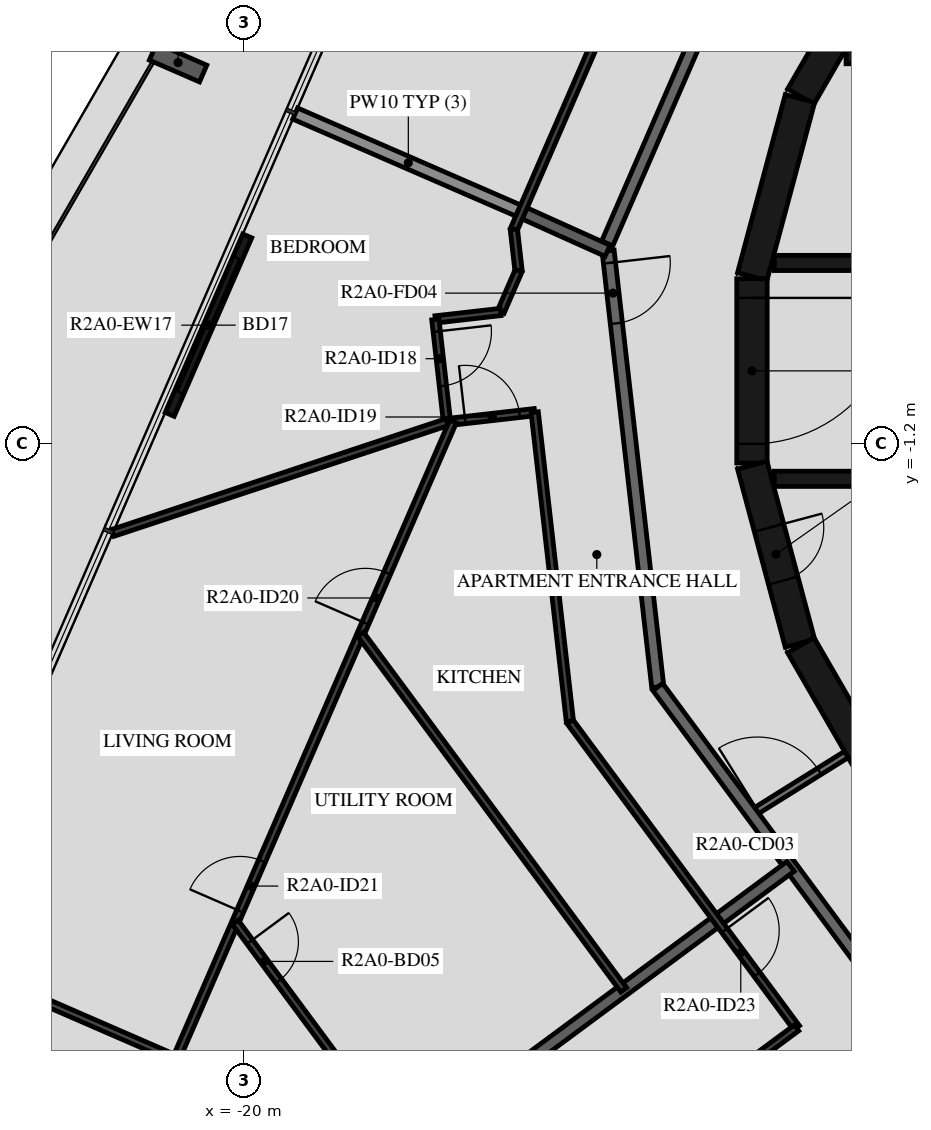
"""IFC4 building model, lengths in metres.
Left out: names, types, materials, properties, quantities, classifications, styles, units other than length and angle.
Written with IfcOpenShell. Run it as: python <this file> out.ifc"""

import sys

from ifc_helpers import new_model, si_unit, direction, frame, frame_2d, origin, origin_2d, place, context, subcontext, project, spatial, rectangle, i_section, extrude, element, fill, save


model = new_model("IFC4")
c1 = context("Model", 3, precision=1e-05, world=origin(), true_north=direction((0.0, 1.0)))
c2 = subcontext(c1, "Body", "Model", "MODEL_VIEW")
j1 = project(units=[si_unit("LENGTHUNIT", "METRE"), si_unit("PLANEANGLEUNIT", "RADIAN")], contexts=[c1])
p1 = place(None, origin())
s1 = spatial("IfcSite", under=j1, at=p1, CompositionType="ELEMENT")
p2 = place(p1, origin())
s2 = spatial("IfcBuilding", under=s1, at=p2, CompositionType="ELEMENT")
p3 = place(p2, frame((0.0, 0.0, 76.7)))
s3 = spatial("IfcBuildingStorey", under=s2, at=p3, CompositionType="ELEMENT", Elevation=76.7)
p4 = place(p3, frame((-21.085, 5.069, -0.45), z_axis=(0.0, 0.0, 1.0), x_axis=(0.398749038162, 0.917060087761, 0.0)))
e1 = element("IfcColumn", 1, at=p4, inside=s3, PredefinedType="COLUMN", context=c2, shape_type="SweptSolid", body=[
    extrude(i_section(OverallWidth=0.3, OverallDepth=0.9, WebThickness=0.019, FlangeThickness=0.035, FilletRadius=0.03, at=origin_2d()), origin(), (0.0, 0.0, 1.0), 3.57),
])
p5 = place(p3, frame((-19.947, 2.219, 0.0), z_axis=(0.0, 0.0, 1.0), x_axis=(-0.398784695066, -0.917044582876, 0.0)))
e2 = element("IfcWall", 2, at=p5, inside=s3, PredefinedType="STANDARD", context=c2, shape_type="SweptSolid", body=[
    extrude(rectangle(XDim=3.2, YDim=0.16, at=frame_2d((1.6, 0.0))), origin(), (0.0, 0.0, 1.0), 3.12),
])
p6 = place(p5, frame((0.4, 0.0, 0.0)))
e3 = element("IfcOpeningElement", 3, at=p6, cuts=e2, PredefinedType="OPENING", context=c2, shape_type="SweptSolid", body=[
    extrude(rectangle(XDim=2.4, YDim=2.4, at=frame_2d((1.2, 1.2))), frame((0.0, 0.09, 0.0), z_axis=(0.0, -1.0, 0.0), x_axis=(1.0, 0.0, 0.0)), (0.0, 0.0, 1.0), 0.18),
])
for number, where, z_axis, x_axis in (
    (4, (-9.329, 7.137, 0.0), (0.0, 0.0, 1.0), (-0.5, -0.866, 0.0)),
    (5, (-10.858, 4.479, 0.0), (0.0, 0.0, 1.0), (-0.259, -0.966, 0.0)),
):
    element("IfcWall", number, at=place(p3, frame(where, z_axis=z_axis, x_axis=x_axis)), inside=s3, PredefinedType="SHEAR", context=c2, shape_type="SweptSolid", body=[
        extrude(rectangle(XDim=3.033, YDim=0.5, at=frame_2d((1.516, 0.0))), origin(), (0.0, 0.0, 1.0), 3.12),
    ])
p7 = place(p3, frame((-11.647, 1.516, 0.0), z_axis=(0.0, 0.0, 1.0), x_axis=(0.0, -1.0, 0.0)))
e6 = element("IfcWall", 6, at=p7, inside=s3, PredefinedType="SHEAR", context=c2, shape_type="SweptSolid", body=[
    extrude(rectangle(XDim=3.033, YDim=0.5, at=frame_2d((1.516, 0.0))), origin(), (0.0, 0.0, 1.0), 3.12),
])
p8 = place(p7, frame((0.316, 0.0, 0.0)))
e7 = element("IfcOpeningElement", 7, at=p8, cuts=e6, PredefinedType="OPENING", context=c2, shape_type="SweptSolid", body=[
    extrude(rectangle(XDim=2.4, YDim=2.1, at=frame_2d((1.2, 1.05))), frame((0.0, 0.26, 0.0), z_axis=(0.0, -1.0, 0.0), x_axis=(1.0, 0.0, 0.0)), (0.0, 0.0, 1.0), 0.52),
])
p9 = place(p3, frame((-11.643, -1.55, 0.0), z_axis=(0.0, 0.0, 1.0), x_axis=(0.258734743916, -0.965948410781, 0.0)))
e8 = element("IfcWall", 8, at=p9, inside=s3, PredefinedType="SHEAR", context=c2, shape_type="SweptSolid", body=[
    extrude(rectangle(XDim=3.033, YDim=0.5, at=frame_2d((1.516, 0.0))), origin(), (0.0, 0.0, 1.0), 3.12),
])
p10 = place(p9, frame((1.066, 0.0, 0.0)))
e9 = element("IfcOpeningElement", 9, at=p10, cuts=e8, PredefinedType="OPENING", context=c2, shape_type="SweptSolid", body=[
    extrude(rectangle(XDim=0.9, YDim=2.1, at=frame_2d((0.45, 1.05))), frame((0.0, 0.26, 0.0), z_axis=(0.0, -1.0, 0.0), x_axis=(1.0, 0.0, 0.0)), (0.0, 0.0, 1.0), 0.52),
])
p11 = place(p3, frame((-10.845, -4.51, 0.0), z_axis=(0.0, 0.0, 1.0), x_axis=(0.500087131594, -0.865975092491, 0.0)))
e10 = element("IfcWall", 10, at=p11, inside=s3, PredefinedType="SHEAR", context=c2, shape_type="SweptSolid", body=[
    extrude(rectangle(XDim=3.033, YDim=0.5, at=frame_2d((1.516, 0.0))), origin(), (0.0, 0.0, 1.0), 3.12),
])
p12 = place(p3, frame((-7.0, 5.175, 0.0), z_axis=(0.0, 0.0, 1.0), x_axis=(-1.0, 0.0, 0.0)))
e11 = element("IfcWall", 11, at=p12, inside=s3, PredefinedType="SHEAR", context=c2, shape_type="SweptSolid", body=[
    extrude(rectangle(XDim=3.1, YDim=0.25, at=frame_2d((1.55, 0.0))), origin(), (0.0, 0.0, 1.0), 3.12),
])
p13 = place(p3, frame((-11.28, 1.775, 0.0), z_axis=(0.0, 0.0, 1.0), x_axis=(1.0, 0.0, 0.0)))
e12 = element("IfcWall", 12, at=p13, inside=s3, PredefinedType="SHEAR", context=c2, shape_type="SweptSolid", body=[
    extrude(rectangle(XDim=14.38, YDim=0.25, at=frame_2d((7.19, 0.0))), origin(), (0.0, 0.0, 1.0), 3.12),
])
p14 = place(p13, frame((2.13, 0.0, 0.0)))
e13 = element("IfcOpeningElement", 13, at=p14, cuts=e12, PredefinedType="OPENING", context=c2, shape_type="SweptSolid", body=[
    extrude(rectangle(XDim=1.1, YDim=2.1, at=frame_2d((0.55, 1.05))), frame((0.0, 0.135, 0.0), z_axis=(0.0, -1.0, 0.0), x_axis=(1.0, 0.0, 0.0)), (0.0, 0.0, 1.0), 0.27),
])
p15 = place(p13, frame((4.28, 0.0, 0.0)))
e14 = element("IfcOpeningElement", 14, at=p15, cuts=e12, PredefinedType="OPENING", context=c2, shape_type="SweptSolid", body=[
    extrude(rectangle(XDim=1.1, YDim=2.1, at=frame_2d((0.55, 1.05))), frame((0.0, 0.135, 0.0), z_axis=(0.0, -1.0, 0.0), x_axis=(1.0, 0.0, 0.0)), (0.0, 0.0, 1.0), 0.27),
])
p16 = place(p13, frame((6.43, 0.0, 0.0)))
e15 = element("IfcOpeningElement", 15, at=p16, cuts=e12, PredefinedType="OPENING", context=c2, shape_type="SweptSolid", body=[
    extrude(rectangle(XDim=1.1, YDim=2.1, at=frame_2d((0.55, 1.05))), frame((0.0, 0.135, 0.0), z_axis=(0.0, -1.0, 0.0), x_axis=(1.0, 0.0, 0.0)), (0.0, 0.0, 1.0), 0.27),
])
p17 = place(p13, frame((8.58, 0.0, 0.0)))
e16 = element("IfcOpeningElement", 16, at=p17, cuts=e12, PredefinedType="OPENING", context=c2, shape_type="SweptSolid", body=[
    extrude(rectangle(XDim=1.1, YDim=2.1, at=frame_2d((0.55, 1.05))), frame((0.0, 0.135, 0.0), z_axis=(0.0, -1.0, 0.0), x_axis=(1.0, 0.0, 0.0)), (0.0, 0.0, 1.0), 0.27),
])
p18 = place(p13, frame((11.905, 0.0, 0.0)))
e17 = element("IfcOpeningElement", 17, at=p18, cuts=e12, PredefinedType="OPENING", context=c2, shape_type="SweptSolid", body=[
    extrude(rectangle(XDim=0.9, YDim=2.1, at=frame_2d((0.45, 1.05))), frame((0.0, 0.135, 0.0), z_axis=(0.0, -1.0, 0.0), x_axis=(1.0, 0.0, 0.0)), (0.0, 0.0, 1.0), 0.27),
])
p19 = place(p3, frame((-11.28, -1.775, 0.0), z_axis=(0.0, 0.0, 1.0), x_axis=(1.0, 0.0, 0.0)))
e18 = element("IfcWall", 18, at=p19, inside=s3, PredefinedType="SHEAR", context=c2, shape_type="SweptSolid", body=[
    extrude(rectangle(XDim=14.38, YDim=0.25, at=frame_2d((7.19, 0.0))), origin(), (0.0, 0.0, 1.0), 3.12),
])
p20 = place(p19, frame((7.605, 0.0, 0.0)))
e19 = element("IfcOpeningElement", 19, at=p20, cuts=e18, PredefinedType="OPENING", context=c2, shape_type="SweptSolid", body=[
    extrude(rectangle(XDim=0.9, YDim=2.1, at=frame_2d((0.45, 1.05))), frame((0.0, 0.135, 0.0), z_axis=(0.0, -1.0, 0.0), x_axis=(1.0, 0.0, 0.0)), (0.0, 0.0, 1.0), 0.27),
])
p21 = place(p19, frame((10.83, 0.0, 0.0)))
e20 = element("IfcOpeningElement", 20, at=p21, cuts=e18, PredefinedType="OPENING", context=c2, shape_type="SweptSolid", body=[
    extrude(rectangle(XDim=0.9, YDim=2.1, at=frame_2d((0.45, 1.05))), frame((0.0, 0.135, 0.0), z_axis=(0.0, -1.0, 0.0), x_axis=(1.0, 0.0, 0.0)), (0.0, 0.0, 1.0), 0.27),
])
p22 = place(p19, frame((12.98, 0.0, 0.0)))
e21 = element("IfcOpeningElement", 21, at=p22, cuts=e18, PredefinedType="OPENING", context=c2, shape_type="SweptSolid", body=[
    extrude(rectangle(XDim=0.9, YDim=2.1, at=frame_2d((0.45, 1.05))), frame((0.0, 0.135, 0.0), z_axis=(0.0, -1.0, 0.0), x_axis=(1.0, 0.0, 0.0)), (0.0, 0.0, 1.0), 0.27),
])
p23 = place(p3, frame((-11.654, -7.282, 0.0), z_axis=(0.0, 0.0, 1.0), x_axis=(0.848117698675, 0.529807860638, 0.0)))
e22 = element("IfcWall", 22, at=p23, inside=s3, PredefinedType="PARTITIONING", context=c2, shape_type="SweptSolid", body=[
    extrude(rectangle(XDim=1.838, YDim=0.12, at=frame_2d((0.919, 0.0))), origin(), (0.0, 0.0, 1.0), 3.12),
])
p24 = place(p23, frame((0.115, 0.0, 0.0)))
e23 = element("IfcOpeningElement", 23, at=p24, cuts=e22, PredefinedType="OPENING", context=c2, shape_type="SweptSolid", body=[
    extrude(rectangle(XDim=1.2, YDim=2.1, at=frame_2d((0.6, 1.05))), frame((0.0, 0.07, 0.0), z_axis=(0.0, -1.0, 0.0), x_axis=(1.0, 0.0, 0.0)), (0.0, 0.0, 1.0), 0.14),
])
p25 = place(p3, frame((-11.1, 8.829, 0.0), z_axis=(0.0, 0.0, 1.0), x_axis=(-0.398741918631, -0.917063183388, 0.0)))
e24 = element("IfcWall", 24, at=p25, inside=s3, PredefinedType="STANDARD", context=c2, shape_type="SweptSolid", body=[
    extrude(rectangle(XDim=7.342, YDim=0.2, at=frame_2d((3.671, 0.0))), origin(), (0.0, 0.0, 1.0), 3.12),
])
p26 = place(p3, frame((-14.013, 1.974, 0.0), z_axis=(0.0, 0.0, 1.0), x_axis=(0.113196526349, -0.993572617589, 0.0)))
e25 = element("IfcWall", 25, at=p26, inside=s3, PredefinedType="STANDARD", context=c2, shape_type="SweptSolid", body=[
    extrude(rectangle(XDim=7.219, YDim=0.2, at=frame_2d((3.609, 0.0))), origin(), (0.0, 0.0, 1.0), 3.12),
])
p27 = place(p26, frame((0.2, 0.0, 0.0)))
e26 = element("IfcOpeningElement", 26, at=p27, cuts=e25, PredefinedType="OPENING", context=c2, shape_type="SweptSolid", body=[
    extrude(rectangle(XDim=1.0, YDim=2.1, at=frame_2d((0.5, 1.05))), frame((0.0, 0.11, 0.0), z_axis=(0.0, -1.0, 0.0), x_axis=(1.0, 0.0, 0.0)), (0.0, 0.0, 1.0), 0.22),
])
p28 = place(p3, frame((-13.196, -5.198, 0.0), z_axis=(0.0, 0.0, 1.0), x_axis=(0.594805187394, -0.803869883159, 0.0)))
e27 = element("IfcWall", 27, at=p28, inside=s3, PredefinedType="STANDARD", context=c2, shape_type="SweptSolid", body=[
    extrude(rectangle(XDim=7.342, YDim=0.2, at=frame_2d((3.671, 0.0))), origin(), (0.0, 0.0, 1.0), 3.12),
])
p29 = place(p3, frame((-15.439, 2.613, 0.0), z_axis=(0.0, 0.0, 1.0), x_axis=(0.911830308819, -0.410567275752, 0.0)))
e28 = element("IfcWall", 28, at=p29, inside=s3, PredefinedType="STANDARD", context=c2, shape_type="SweptSolid", body=[
    extrude(rectangle(XDim=1.553, YDim=0.2, at=frame_2d((0.777, 0.0))), origin(), (0.0, 0.0, 1.0), 3.12),
])
p30 = place(p3, frame((-19.159, 4.231, 0.0), z_axis=(0.0, 0.0, 1.0), x_axis=(0.91704996524, -0.398772317562, 0.0)))
e29 = element("IfcWall", 29, at=p30, inside=s3, PredefinedType="STANDARD", context=c2, shape_type="SweptSolid", body=[
    extrude(rectangle(XDim=4.057, YDim=0.2, at=frame_2d((2.029, 0.0))), origin(), (0.0, 0.0, 1.0), 2.73),
])
p31 = place(p3, frame((-15.41, -11.403, 0.0), z_axis=(0.0, 0.0, 1.0), x_axis=(0.803887568227, 0.594781285558, 0.0)))
e30 = element("IfcWall", 30, at=p31, inside=s3, PredefinedType="STANDARD", context=c2, shape_type="SweptSolid", body=[
    extrude(rectangle(XDim=5.47, YDim=0.2, at=frame_2d((2.735, 0.0))), origin(), (0.0, 0.0, 1.0), 3.12),
])
p32 = place(p3, frame((-14.049, 5.81, 0.0), z_axis=(0.0, 0.0, 1.0), x_axis=(-0.398707311688, -0.917078229818, 0.0)))
e31 = element("IfcWall", 31, at=p32, inside=s3, PredefinedType="PARTITIONING", context=c2, shape_type="SweptSolid", body=[
    extrude(rectangle(XDim=3.799, YDim=0.12, at=frame_2d((1.899, 0.0))), origin(), (0.0, 0.0, 1.0), 3.12),
])
p33 = place(p3, frame((-15.563, 2.326, 0.0), z_axis=(0.0, 0.0, 1.0), x_axis=(0.113013677091, -0.993593432341, 0.0)))
e32 = element("IfcWall", 32, at=p33, inside=s3, PredefinedType="PARTITIONING", context=c2, shape_type="SweptSolid", body=[
    extrude(rectangle(XDim=0.685, YDim=0.12, at=frame_2d((0.342, 0.0))), origin(), (0.0, 0.0, 1.0), 3.12),
])
p34 = place(p3, frame((-15.486, 1.646, 0.0), z_axis=(0.0, 0.0, 1.0), x_axis=(-0.398701933952, -0.917080567814, 0.0)))
e33 = element("IfcWall", 33, at=p34, inside=s3, PredefinedType="PARTITIONING", context=c2, shape_type="SweptSolid", body=[
    extrude(rectangle(XDim=0.739, YDim=0.12, at=frame_2d((0.369, 0.0))), origin(), (0.0, 0.0, 1.0), 3.12),
])
p35 = place(p3, frame((-15.78, 0.968, 0.0), z_axis=(0.0, 0.0, 1.0), x_axis=(-0.99355448905, -0.113355534887, 0.0)))
e34 = element("IfcWall", 34, at=p35, inside=s3, PredefinedType="PARTITIONING", context=c2, shape_type="SweptSolid", body=[
    extrude(rectangle(XDim=1.081, YDim=0.12, at=frame_2d((0.541, 0.0))), origin(), (0.0, 0.0, 1.0), 3.12),
])
p36 = place(p3, frame((-16.854, 0.846, 0.0), z_axis=(0.0, 0.0, 1.0), x_axis=(0.113173930474, -0.993575191649, 0.0)))
e35 = element("IfcWall", 35, at=p36, inside=s3, PredefinedType="PARTITIONING", context=c2, shape_type="SweptSolid", body=[
    extrude(rectangle(XDim=1.7, YDim=0.12, at=frame_2d((0.85, 0.0))), origin(), (0.0, 0.0, 1.0), 3.12),
])
p37 = place(p36, frame((0.2, 0.0, 0.0)))
e36 = element("IfcOpeningElement", 36, at=p37, cuts=e35, PredefinedType="OPENING", context=c2, shape_type="SweptSolid", body=[
    extrude(rectangle(XDim=0.9, YDim=2.1, at=frame_2d((0.45, 1.05))), frame((0.0, 0.07, 0.0), z_axis=(0.0, -1.0, 0.0), x_axis=(1.0, 0.0, 0.0)), (0.0, 0.0, 1.0), 0.14),
])
p38 = place(p3, frame((-16.563, -0.832, 0.0), z_axis=(0.0, 0.0, 1.0), x_axis=(0.993578035261, 0.113148963084, 0.0)))
e37 = element("IfcWall", 37, at=p38, inside=s3, PredefinedType="PARTITIONING", context=c2, shape_type="SweptSolid", body=[
    extrude(rectangle(XDim=1.351, YDim=0.12, at=frame_2d((0.675, 0.0))), origin(), (0.0, 0.0, 1.0), 3.12),
])
p39 = place(p38, frame((0.2, 0.0, 0.0)))
e38 = element("IfcOpeningElement", 38, at=p39, cuts=e37, PredefinedType="OPENING", context=c2, shape_type="SweptSolid", body=[
    extrude(rectangle(XDim=0.9, YDim=2.1, at=frame_2d((0.45, 1.05))), frame((0.0, 0.07, 0.0), z_axis=(0.0, -1.0, 0.0), x_axis=(1.0, 0.0, 0.0)), (0.0, 0.0, 1.0), 0.14),
])
p40 = place(p3, frame((-15.221, -0.679, 0.0), z_axis=(0.0, 0.0, 1.0), x_axis=(0.113219875647, -0.993569957154, 0.0)))
e39 = element("IfcWall", 39, at=p40, inside=s3, PredefinedType="PARTITIONING", context=c2, shape_type="SweptSolid", body=[
    extrude(rectangle(XDim=5.121, YDim=0.12, at=frame_2d((2.561, 0.0))), origin(), (0.0, 0.0, 1.0), 3.12),
])
p41 = place(p3, frame((-14.641, -5.767, 0.0), z_axis=(0.0, 0.0, 1.0), x_axis=(0.594825885962, -0.803854567313, 0.0)))
e40 = element("IfcWall", 40, at=p41, inside=s3, PredefinedType="PARTITIONING", context=c2, shape_type="SweptSolid", body=[
    extrude(rectangle(XDim=6.266, YDim=0.12, at=frame_2d((3.133, 0.0))), origin(), (0.0, 0.0, 1.0), 3.12),
])
p42 = place(p41, frame((4.273, 0.0, 0.0)))
e41 = element("IfcOpeningElement", 41, at=p42, cuts=e40, PredefinedType="OPENING", context=c2, shape_type="SweptSolid", body=[
    extrude(rectangle(XDim=0.9, YDim=2.1, at=frame_2d((0.45, 1.05))), frame((0.0, 0.07, 0.0), z_axis=(0.0, -1.0, 0.0), x_axis=(1.0, 0.0, 0.0)), (0.0, 0.0, 1.0), 0.14),
])
p43 = place(p3, frame((-22.157, -2.664, 0.0), z_axis=(0.0, 0.0, 1.0), x_axis=(0.949263673698, 0.314481283698, 0.0)))
e42 = element("IfcWall", 42, at=p43, inside=s3, PredefinedType="PARTITIONING", context=c2, shape_type="SweptSolid", body=[
    extrude(rectangle(XDim=5.789, YDim=0.12, at=frame_2d((2.895, 0.0))), origin(), (0.0, 0.0, 1.0), 3.12),
])
p44 = place(p3, frame((-21.298, -11.722, 0.0), z_axis=(0.0, 0.0, 1.0), x_axis=(0.398737387658, 0.917065153456, 0.0)))
e43 = element("IfcWall", 43, at=p44, inside=s3, PredefinedType="PARTITIONING", context=c2, shape_type="SweptSolid", body=[
    extrude(rectangle(XDim=11.875, YDim=0.12, at=frame_2d((5.938, 0.0))), origin(), (0.0, 0.0, 1.0), 3.12),
])
p45 = place(p44, frame((8.26, 0.0, 0.0)))
e44 = element("IfcOpeningElement", 44, at=p45, cuts=e43, PredefinedType="OPENING", context=c2, shape_type="SweptSolid", body=[
    extrude(rectangle(XDim=0.9, YDim=2.1, at=frame_2d((0.45, 1.05))), frame((0.0, 0.07, 0.0), z_axis=(0.0, -1.0, 0.0), x_axis=(1.0, 0.0, 0.0)), (0.0, 0.0, 1.0), 0.14),
])
p46 = place(p44, frame((3.094, 0.0, 0.0)))
e45 = element("IfcOpeningElement", 45, at=p46, cuts=e43, PredefinedType="OPENING", context=c2, shape_type="SweptSolid", body=[
    extrude(rectangle(XDim=0.9, YDim=2.1, at=frame_2d((0.45, 1.05))), frame((0.0, 0.07, 0.0), z_axis=(0.0, -1.0, 0.0), x_axis=(1.0, 0.0, 0.0)), (0.0, 0.0, 1.0), 0.14),
])
p47 = place(p3, frame((-25.156, -9.559, 0.0), z_axis=(0.0, 0.0, 1.0), x_axis=(0.917042707292, -0.398789008127, 0.0)))
e46 = element("IfcWall", 46, at=p47, inside=s3, PredefinedType="PARTITIONING", context=c2, shape_type="SweptSolid", body=[
    extrude(rectangle(XDim=4.4, YDim=0.12, at=frame_2d((2.2, 0.0))), origin(), (0.0, 0.0, 1.0), 2.73),
])
p48 = place(p47, frame((0.2, 0.0, 0.0)))
e47 = element("IfcOpeningElement", 47, at=p48, cuts=e46, PredefinedType="OPENING", context=c2, shape_type="SweptSolid", body=[
    extrude(rectangle(XDim=0.9, YDim=2.1, at=frame_2d((0.45, 1.05))), frame((0.0, 0.07, 0.0), z_axis=(0.0, -1.0, 0.0), x_axis=(1.0, 0.0, 0.0)), (0.0, 0.0, 1.0), 0.14),
])
p49 = place(p3, frame((-18.084, -4.331, 0.0), z_axis=(0.0, 0.0, 1.0), x_axis=(0.594811782108, -0.803865003508, 0.0)))
e48 = element("IfcWall", 48, at=p49, inside=s3, PredefinedType="PARTITIONING", context=c2, shape_type="SweptSolid", body=[
    extrude(rectangle(XDim=7.276, YDim=0.12, at=frame_2d((3.638, 0.0))), origin(), (0.0, 0.0, 1.0), 3.12),
])
p50 = place(p3, frame((-20.144, -9.068, 0.0), z_axis=(0.0, 0.0, 1.0), x_axis=(0.59487477233, -0.803818390711, 0.0)))
e49 = element("IfcWall", 49, at=p50, inside=s3, PredefinedType="PARTITIONING", context=c2, shape_type="SweptSolid", body=[
    extrude(rectangle(XDim=3.575, YDim=0.12, at=frame_2d((1.788, 0.0))), origin(), (0.0, 0.0, 1.0), 3.12),
])
p51 = place(p50, frame((0.4, 0.0, 0.0)))
e50 = element("IfcOpeningElement", 50, at=p51, cuts=e49, PredefinedType="OPENING", context=c2, shape_type="SweptSolid", body=[
    extrude(rectangle(XDim=0.8, YDim=2.1, at=frame_2d((0.4, 1.05))), frame((0.0, 0.07, 0.0), z_axis=(0.0, -1.0, 0.0), x_axis=(1.0, 0.0, 0.0)), (0.0, 0.0, 1.0), 0.14),
])
p52 = place(p3, frame((-10.914, -10.804, 0.0), z_axis=(0.0, 0.0, 1.0), x_axis=(-0.803864616889, -0.594812304609, 0.0)))
e51 = element("IfcWall", 51, at=p52, inside=s3, PredefinedType="PARTITIONING", context=c2, shape_type="SweptSolid", body=[
    extrude(rectangle(XDim=4.008, YDim=0.12, at=frame_2d((2.004, 0.0))), origin(), (0.0, 0.0, 1.0), 3.12),
])
p53 = place(p6, origin())
e52 = element("IfcDoor", 52, at=p53, inside=s3, OperationType="DOUBLE_DOOR_SLIDING", PredefinedType="DOOR", context=c2, shape_type="SweptSolid", body=[
    extrude(rectangle(XDim=2.4, YDim=2.4, at=frame_2d((1.2, 1.2))), frame((0.0, 0.025, 0.0), z_axis=(0.0, -1.0, 0.0), x_axis=(1.0, 0.0, 0.0)), (0.0, 0.0, 1.0), 0.05),
])
fill(e3, e52)
p54 = place(p8, origin())
e53 = element("IfcDoor", 53, at=p54, inside=s3, OperationType="DOUBLE_DOOR_SINGLE_SWING", PredefinedType="DOOR", context=c2, shape_type="SweptSolid", body=[
    extrude(rectangle(XDim=2.4, YDim=2.1, at=frame_2d((1.2, 1.05))), frame((0.0, 0.025, 0.0), z_axis=(0.0, -1.0, 0.0), x_axis=(1.0, 0.0, 0.0)), (0.0, 0.0, 1.0), 0.05),
])
fill(e7, e53)
p55 = place(p10, origin())
e54 = element("IfcDoor", 54, at=p55, inside=s3, OperationType="SINGLE_SWING_LEFT", PredefinedType="DOOR", context=c2, shape_type="SweptSolid", body=[
    extrude(rectangle(XDim=0.9, YDim=2.1, at=frame_2d((0.45, 1.05))), frame((0.0, 0.025, 0.0), z_axis=(0.0, -1.0, 0.0), x_axis=(1.0, 0.0, 0.0)), (0.0, 0.0, 1.0), 0.05),
])
fill(e9, e54)
p56 = place(p27, origin())
e55 = element("IfcDoor", 55, at=p56, inside=s3, OperationType="SINGLE_SWING_RIGHT", PredefinedType="DOOR", context=c2, shape_type="SweptSolid", body=[
    extrude(rectangle(XDim=1.0, YDim=2.1, at=frame_2d((0.5, 1.05))), frame((0.0, 0.025, 0.0), z_axis=(0.0, -1.0, 0.0), x_axis=(1.0, 0.0, 0.0)), (0.0, 0.0, 1.0), 0.05),
])
fill(e26, e55)
p57 = place(p37, origin())
e56 = element("IfcDoor", 56, at=p57, inside=s3, OperationType="SINGLE_SWING_RIGHT", PredefinedType="DOOR", context=c2, shape_type="SweptSolid", body=[
    extrude(rectangle(XDim=0.9, YDim=2.1, at=frame_2d((0.45, 1.05))), frame((0.0, 0.025, 0.0), z_axis=(0.0, -1.0, 0.0), x_axis=(1.0, 0.0, 0.0)), (0.0, 0.0, 1.0), 0.05),
])
fill(e36, e56)
p58 = place(p39, origin())
e57 = element("IfcDoor", 57, at=p58, inside=s3, OperationType="SINGLE_SWING_LEFT", PredefinedType="DOOR", context=c2, shape_type="SweptSolid", body=[
    extrude(rectangle(XDim=0.9, YDim=2.1, at=frame_2d((0.45, 1.05))), frame((0.0, 0.025, 0.0), z_axis=(0.0, -1.0, 0.0), x_axis=(1.0, 0.0, 0.0)), (0.0, 0.0, 1.0), 0.05),
])
fill(e38, e57)
p59 = place(p45, origin())
e58 = element("IfcDoor", 58, at=p59, inside=s3, OperationType="SINGLE_SWING_RIGHT", PredefinedType="DOOR", context=c2, shape_type="SweptSolid", body=[
    extrude(rectangle(XDim=0.9, YDim=2.1, at=frame_2d((0.45, 1.05))), frame((0.0, 0.025, 0.0), z_axis=(0.0, -1.0, 0.0), x_axis=(1.0, 0.0, 0.0)), (0.0, 0.0, 1.0), 0.05),
])
fill(e44, e58)
p60 = place(p46, origin())
e59 = element("IfcDoor", 59, at=p60, inside=s3, OperationType="SINGLE_SWING_LEFT", PredefinedType="DOOR", context=c2, shape_type="SweptSolid", body=[
    extrude(rectangle(XDim=0.9, YDim=2.1, at=frame_2d((0.45, 1.05))), frame((0.0, 0.025, 0.0), z_axis=(0.0, -1.0, 0.0), x_axis=(1.0, 0.0, 0.0)), (0.0, 0.0, 1.0), 0.05),
])
fill(e45, e59)
p61 = place(p51, origin())
e60 = element("IfcDoor", 60, at=p61, inside=s3, OperationType="SINGLE_SWING_RIGHT", PredefinedType="DOOR", context=c2, shape_type="SweptSolid", body=[
    extrude(rectangle(XDim=0.8, YDim=2.1, at=frame_2d((0.4, 1.05))), frame((0.0, 0.025, 0.0), z_axis=(0.0, -1.0, 0.0), x_axis=(1.0, 0.0, 0.0)), (0.0, 0.0, 1.0), 0.05),
])
fill(e50, e60)
p62 = place(p42, origin())
e61 = element("IfcDoor", 61, at=p62, inside=s3, OperationType="SINGLE_SWING_LEFT", PredefinedType="DOOR", context=c2, shape_type="SweptSolid", body=[
    extrude(rectangle(XDim=0.9, YDim=2.1, at=frame_2d((0.45, 1.05))), frame((0.0, 0.025, 0.0), z_axis=(0.0, -1.0, 0.0), x_axis=(1.0, 0.0, 0.0)), (0.0, 0.0, 1.0), 0.05),
])
fill(e41, e61)
p63 = place(p24, origin())
e62 = element("IfcDoor", 62, at=p63, inside=s3, OperationType="DOUBLE_DOOR_SINGLE_SWING", PredefinedType="DOOR", context=c2, shape_type="SweptSolid", body=[
    extrude(rectangle(XDim=1.2, YDim=2.1, at=frame_2d((0.6, 1.05))), frame((0.0, 0.025, 0.0), z_axis=(0.0, -1.0, 0.0), x_axis=(1.0, 0.0, 0.0)), (0.0, 0.0, 1.0), 0.05),
])
fill(e23, e62)
save(model, sys.argv[1])
